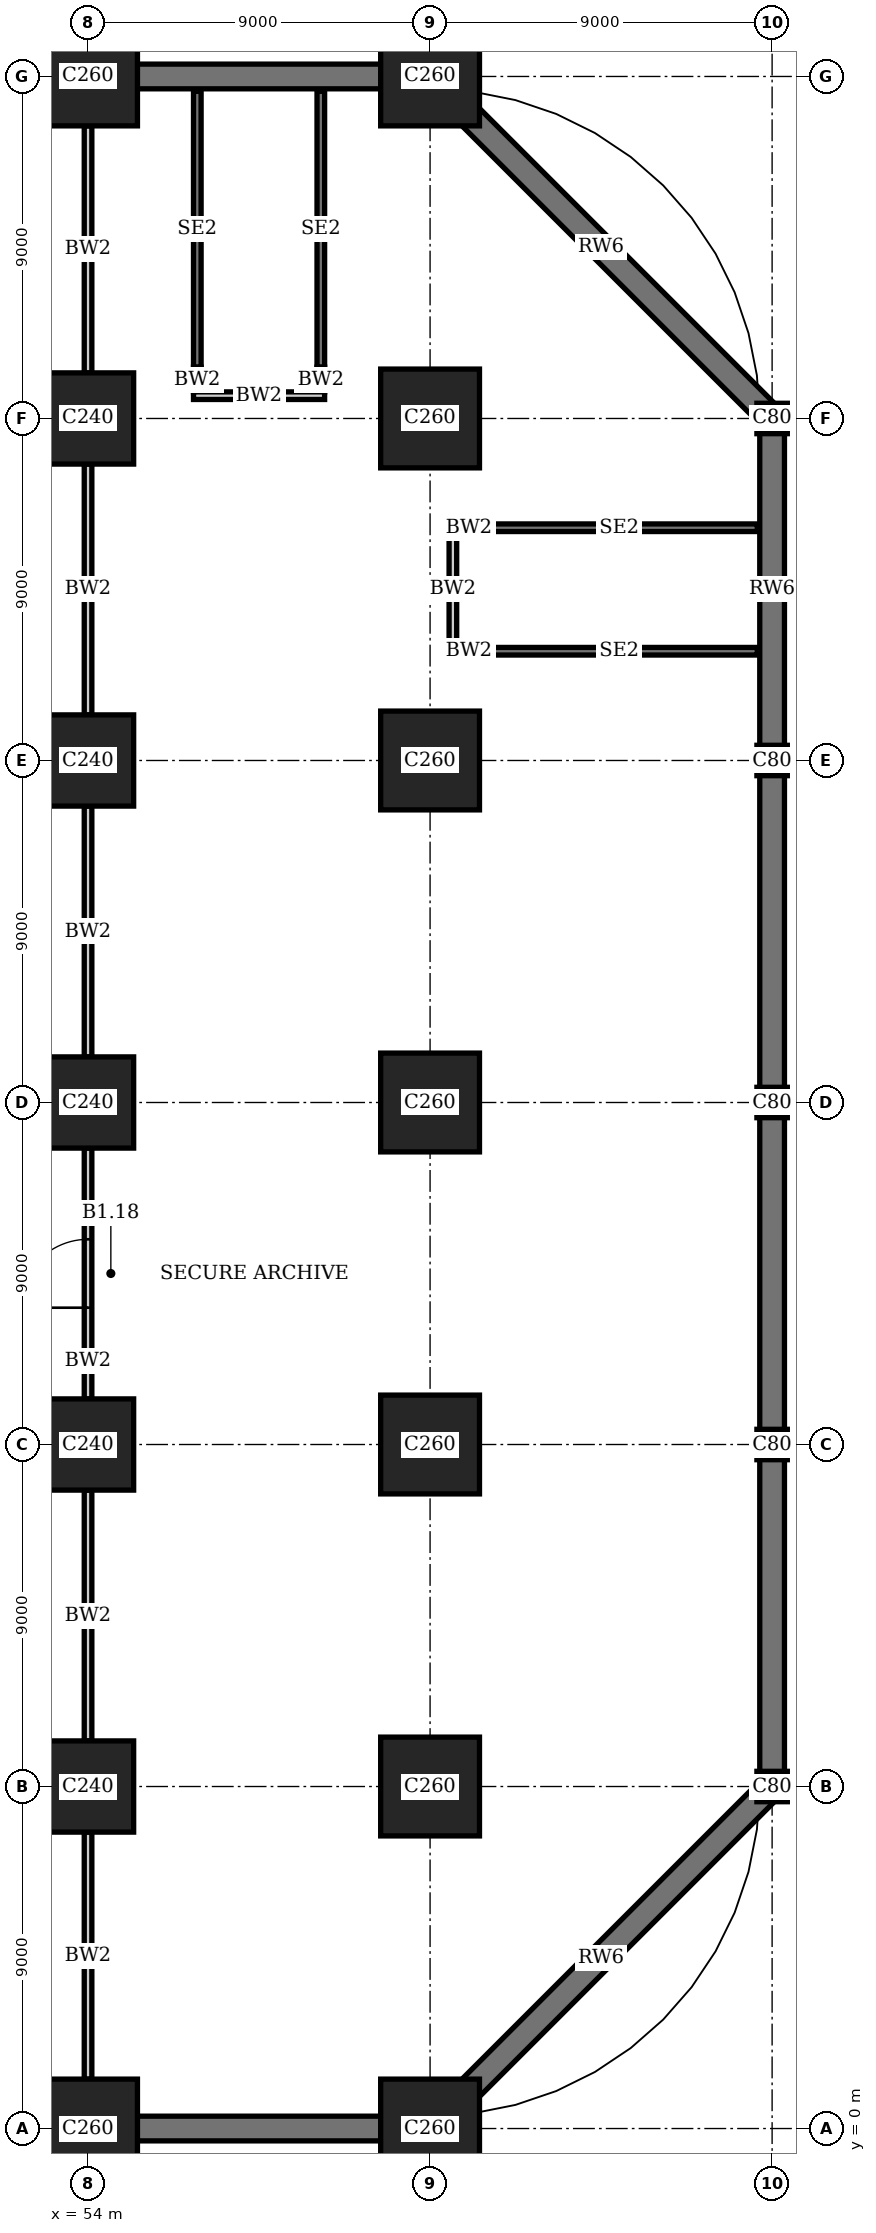
"""IFC4 building model, lengths in metres.
Left out: names, types, materials, properties, quantities, classifications, styles, units other than length and angle.
Written with IfcOpenShell. Run it as: python <this file> out.ifc"""

import sys

from ifc_helpers import new_model, si_unit, direction, frame, frame_2d, origin, origin_2d, place, context, subcontext, project, spatial, rectangle, extrude, element, fill, save


model = new_model("IFC4")
c1 = context("Model", 3, precision=1e-05, world=origin(), true_north=direction((0.0, 1.0)))
c2 = subcontext(c1, "Body", "Model", "MODEL_VIEW")
j1 = project(units=[si_unit("LENGTHUNIT", "METRE"), si_unit("PLANEANGLEUNIT", "RADIAN")], contexts=[c1])
p1 = place(None, origin())
s1 = spatial("IfcSite", under=j1, at=p1, CompositionType="ELEMENT")
p2 = place(p1, origin())
s2 = spatial("IfcBuilding", under=s1, at=p2, CompositionType="ELEMENT")
p3 = place(p2, frame((0.0, 0.0, -5.0)))
s3 = spatial("IfcBuildingStorey", under=s2, at=p3, CompositionType="ELEMENT", Elevation=-5.0)
p4 = place(p3, frame((54.0, 0.0, -0.45), z_axis=(0.0, 0.0, 1.0), x_axis=(1.0, 0.0, 0.0)))
e1 = element("IfcColumn", 1, at=p4, inside=s3, PredefinedType="COLUMN", context=c2, shape_type="SweptSolid", body=[
    extrude(rectangle(XDim=2.6, YDim=2.6, at=origin_2d()), origin(), (0.0, 0.0, 1.0), 5.45),
])
for number, where, z_axis, x_axis in (
    (2, (54.0, 9.0, -0.45), (0.0, 0.0, 1.0), (1.0, 0.0, 0.0)),
    (3, (54.0, 18.0, -0.45), (0.0, 0.0, 1.0), (1.0, 0.0, 0.0)),
    (4, (54.0, 27.0, -0.45), (0.0, 0.0, 1.0), (1.0, 0.0, 0.0)),
    (5, (54.0, 36.0, -0.45), (0.0, 0.0, 1.0), (1.0, 0.0, 0.0)),
    (6, (54.0, 45.0, -0.45), (0.0, 0.0, 1.0), (1.0, 0.0, 0.0)),
):
    element("IfcColumn", number, at=place(p3, frame(where, z_axis=z_axis, x_axis=x_axis)), inside=s3, PredefinedType="COLUMN", context=c2, shape_type="SweptSolid", body=[
        extrude(rectangle(XDim=2.4, YDim=2.4, at=origin_2d()), origin(), (0.0, 0.0, 1.0), 5.45),
    ])
for number, where, z_axis, x_axis in (
    (7, (54.0, 54.0, -0.45), (0.0, 0.0, 1.0), (1.0, 0.0, 0.0)),
    (8, (63.0, 0.0, -0.45), (0.0, 0.0, 1.0), (1.0, 0.0, 0.0)),
    (9, (63.0, 9.0, -0.45), (0.0, 0.0, 1.0), (1.0, 0.0, 0.0)),
    (10, (63.0, 18.0, -0.45), (0.0, 0.0, 1.0), (1.0, 0.0, 0.0)),
    (11, (63.0, 27.0, -0.45), (0.0, 0.0, 1.0), (1.0, 0.0, 0.0)),
    (12, (63.0, 36.0, -0.45), (0.0, 0.0, 1.0), (1.0, 0.0, 0.0)),
    (13, (63.0, 45.0, -0.45), (0.0, 0.0, 1.0), (1.0, 0.0, 0.0)),
    (14, (63.0, 54.0, -0.45), (0.0, 0.0, 1.0), (1.0, 0.0, 0.0)),
):
    element("IfcColumn", number, at=place(p3, frame(where, z_axis=z_axis, x_axis=x_axis)), inside=s3, PredefinedType="COLUMN", context=c2, shape_type="SweptSolid", body=[
        extrude(rectangle(XDim=2.6, YDim=2.6, at=origin_2d()), origin(), (0.0, 0.0, 1.0), 5.45),
    ])
for number, where, z_axis, x_axis in (
    (15, (72.0, 9.0, -0.45), (0.0, 0.0, 1.0), (1.0, 0.0, 0.0)),
    (16, (72.0, 18.0, -0.45), (0.0, 0.0, 1.0), (1.0, 0.0, 0.0)),
    (17, (72.0, 27.0, -0.45), (0.0, 0.0, 1.0), (1.0, 0.0, 0.0)),
    (18, (72.0, 36.0, -0.45), (0.0, 0.0, 1.0), (1.0, 0.0, 0.0)),
    (19, (72.0, 45.0, -0.45), (0.0, 0.0, 1.0), (1.0, 0.0, 0.0)),
):
    element("IfcColumn", number, at=place(p3, frame(where, z_axis=z_axis, x_axis=x_axis)), inside=s3, PredefinedType="COLUMN", context=c2, shape_type="SweptSolid", body=[
        extrude(rectangle(XDim=0.8, YDim=0.8, at=origin_2d()), origin(), (0.0, 0.0, 1.0), 5.45),
    ])
p5 = place(p3, frame((0.0, 0.0, -0.45), z_axis=(0.0, 0.0, 1.0), x_axis=(1.0, 0.0, 0.0)))
e20 = element("IfcWall", 20, at=p5, inside=s3, PredefinedType="SOLIDWALL", context=c2, shape_type="SweptSolid", body=[
    extrude(rectangle(XDim=63.0, YDim=0.65, at=frame_2d((31.5, 0.0))), origin(), (0.0, 0.0, 1.0), 5.45),
])
p6 = place(p3, frame((72.0, 9.0, -0.45), z_axis=(0.0, 0.0, 1.0), x_axis=(0.0, 1.0, 0.0)))
e21 = element("IfcWall", 21, at=p6, inside=s3, PredefinedType="SOLIDWALL", context=c2, shape_type="SweptSolid", body=[
    extrude(rectangle(XDim=36.0, YDim=0.65, at=frame_2d((18.0, 0.0))), origin(), (0.0, 0.0, 1.0), 5.45),
])
p7 = place(p3, frame((63.0, 54.0, -0.45), z_axis=(0.0, 0.0, 1.0), x_axis=(-1.0, 0.0, 0.0)))
e22 = element("IfcWall", 22, at=p7, inside=s3, PredefinedType="SOLIDWALL", context=c2, shape_type="SweptSolid", body=[
    extrude(rectangle(XDim=63.0, YDim=0.65, at=frame_2d((31.5, 0.0))), origin(), (0.0, 0.0, 1.0), 5.45),
])
for number, where, z_axis, x_axis in (
    (23, (63.0, 0.0, -0.45), (0.0, 0.0, 1.0), (0.707, 0.707, 0.0)),
    (24, (72.0, 45.0, -0.45), (0.0, 0.0, 1.0), (-0.707, 0.707, 0.0)),
):
    element("IfcWall", number, at=place(p3, frame(where, z_axis=z_axis, x_axis=x_axis)), inside=s3, PredefinedType="SOLIDWALL", context=c2, shape_type="SweptSolid", body=[
        extrude(rectangle(XDim=12.728, YDim=0.65, at=frame_2d((6.364, 0.0))), origin(), (0.0, 0.0, 1.0), 5.45),
    ])
p8 = place(p3, frame((54.0, 1.3, 0.0), z_axis=(0.0, 0.0, 1.0), x_axis=(0.0, 1.0, 0.0)))
e25 = element("IfcWall", 25, at=p8, inside=s3, PredefinedType="SOLIDWALL", context=c2, shape_type="SweptSolid", body=[
    extrude(rectangle(XDim=6.5, YDim=0.2, at=frame_2d((3.25, 0.0))), origin(), (0.0, 0.0, 1.0), 3.9),
])
p9 = place(p3, frame((54.0, 10.2, 0.0), z_axis=(0.0, 0.0, 1.0), x_axis=(0.0, 1.0, 0.0)))
e26 = element("IfcWall", 26, at=p9, inside=s3, PredefinedType="SOLIDWALL", context=c2, shape_type="SweptSolid", body=[
    extrude(rectangle(XDim=6.6, YDim=0.2, at=frame_2d((3.3, 0.0))), origin(), (0.0, 0.0, 1.0), 3.9),
])
p10 = place(p3, frame((54.0, 19.2, 0.0), z_axis=(0.0, 0.0, 1.0), x_axis=(0.0, 1.0, 0.0)))
e27 = element("IfcWall", 27, at=p10, inside=s3, PredefinedType="SOLIDWALL", context=c2, shape_type="SweptSolid", body=[
    extrude(rectangle(XDim=6.6, YDim=0.2, at=frame_2d((3.3, 0.0))), origin(), (0.0, 0.0, 1.0), 3.9),
])
p11 = place(p10, frame((2.4, 0.0, 0.0)))
e28 = element("IfcOpeningElement", 28, at=p11, cuts=e27, PredefinedType="OPENING", context=c2, shape_type="SweptSolid", body=[
    extrude(rectangle(XDim=1.8, YDim=2.4, at=frame_2d((0.9, 1.2))), frame((0.0, 0.11, 0.0), z_axis=(0.0, -1.0, 0.0), x_axis=(1.0, 0.0, 0.0)), (0.0, 0.0, 1.0), 0.22),
])
for number, where, z_axis, x_axis in (
    (29, (54.0, 28.2, 0.0), (0.0, 0.0, 1.0), (0.0, 1.0, 0.0)),
    (30, (54.0, 37.2, 0.0), (0.0, 0.0, 1.0), (0.0, 1.0, 0.0)),
):
    element("IfcWall", number, at=place(p3, frame(where, z_axis=z_axis, x_axis=x_axis)), inside=s3, PredefinedType="SOLIDWALL", context=c2, shape_type="SweptSolid", body=[
        extrude(rectangle(XDim=6.6, YDim=0.2, at=frame_2d((3.3, 0.0))), origin(), (0.0, 0.0, 1.0), 3.9),
    ])
p12 = place(p3, frame((54.0, 46.2, 0.0), z_axis=(0.0, 0.0, 1.0), x_axis=(0.0, 1.0, 0.0)))
e31 = element("IfcWall", 31, at=p12, inside=s3, PredefinedType="SOLIDWALL", context=c2, shape_type="SweptSolid", body=[
    extrude(rectangle(XDim=6.5, YDim=0.2, at=frame_2d((3.25, 0.0))), origin(), (0.0, 0.0, 1.0), 3.9),
])
for number, where, z_axis, x_axis in (
    (32, (71.61, 42.125, -0.45), (0.0, 0.0, 1.0), (-1.0, 0.0, 0.0)),
    (33, (71.61, 38.875, -0.45), (0.0, 0.0, 1.0), (-1.0, 0.0, 0.0)),
):
    element("IfcWall", number, at=place(p3, frame(where, z_axis=z_axis, x_axis=x_axis)), inside=s3, PredefinedType="SOLIDWALL", context=c2, shape_type="SweptSolid", body=[
        extrude(rectangle(XDim=7.26, YDim=0.2, at=frame_2d((3.63, 0.0))), origin(), (0.0, 0.0, 1.0), 5.45),
    ])
for number, where, z_axis, x_axis in (
    (34, (64.35, 42.125, -0.45), (0.0, 0.0, 1.0), (-1.0, 0.0, 0.0)),
    (35, (64.35, 38.875, -0.45), (0.0, 0.0, 1.0), (-1.0, 0.0, 0.0)),
):
    element("IfcWall", number, at=place(p3, frame(where, z_axis=z_axis, x_axis=x_axis)), inside=s3, PredefinedType="SOLIDWALL", context=c2, shape_type="SweptSolid", body=[
        extrude(rectangle(XDim=0.65, YDim=0.2, at=frame_2d((0.325, 0.0))), origin(), (0.0, 0.0, 1.0), 5.45),
    ])
p13 = place(p3, frame((63.6, 42.225, -0.45), z_axis=(0.0, 0.0, 1.0), x_axis=(0.0, -1.0, 0.0)))
e36 = element("IfcWall", 36, at=p13, inside=s3, PredefinedType="SOLIDWALL", context=c2, shape_type="SweptSolid", body=[
    extrude(rectangle(XDim=3.45, YDim=0.2, at=frame_2d((1.725, 0.0))), origin(), (0.0, 0.0, 1.0), 4.35),
])
for number, where, z_axis, x_axis in (
    (37, (56.875, 53.61, -0.45), (0.0, 0.0, 1.0), (0.0, -1.0, 0.0)),
    (38, (60.125, 53.61, -0.45), (0.0, 0.0, 1.0), (0.0, -1.0, 0.0)),
):
    element("IfcWall", number, at=place(p3, frame(where, z_axis=z_axis, x_axis=x_axis)), inside=s3, PredefinedType="SOLIDWALL", context=c2, shape_type="SweptSolid", body=[
        extrude(rectangle(XDim=7.26, YDim=0.2, at=frame_2d((3.63, 0.0))), origin(), (0.0, 0.0, 1.0), 5.45),
    ])
for number, where, z_axis, x_axis in (
    (39, (56.875, 46.35, -0.45), (0.0, 0.0, 1.0), (0.0, -1.0, 0.0)),
    (40, (60.125, 46.35, -0.45), (0.0, 0.0, 1.0), (0.0, -1.0, 0.0)),
):
    element("IfcWall", number, at=place(p3, frame(where, z_axis=z_axis, x_axis=x_axis)), inside=s3, PredefinedType="SOLIDWALL", context=c2, shape_type="SweptSolid", body=[
        extrude(rectangle(XDim=0.65, YDim=0.2, at=frame_2d((0.325, 0.0))), origin(), (0.0, 0.0, 1.0), 5.45),
    ])
p14 = place(p3, frame((56.775, 45.6, -0.45), z_axis=(0.0, 0.0, 1.0), x_axis=(1.0, 0.0, 0.0)))
e41 = element("IfcWall", 41, at=p14, inside=s3, PredefinedType="SOLIDWALL", context=c2, shape_type="SweptSolid", body=[
    extrude(rectangle(XDim=3.45, YDim=0.2, at=frame_2d((1.725, 0.0))), origin(), (0.0, 0.0, 1.0), 5.45),
])
p15 = place(p11, origin())
e42 = element("IfcDoor", 42, at=p15, inside=s3, OperationType="DOUBLE_DOOR_SINGLE_SWING", PredefinedType="DOOR", context=c2, shape_type="SweptSolid", body=[
    extrude(rectangle(XDim=1.8, YDim=2.4, at=frame_2d((0.9, 1.2))), frame((0.0, 0.025, 0.0), z_axis=(0.0, -1.0, 0.0), x_axis=(1.0, 0.0, 0.0)), (0.0, 0.0, 1.0), 0.05),
])
fill(e28, e42)
save(model, sys.argv[1])
